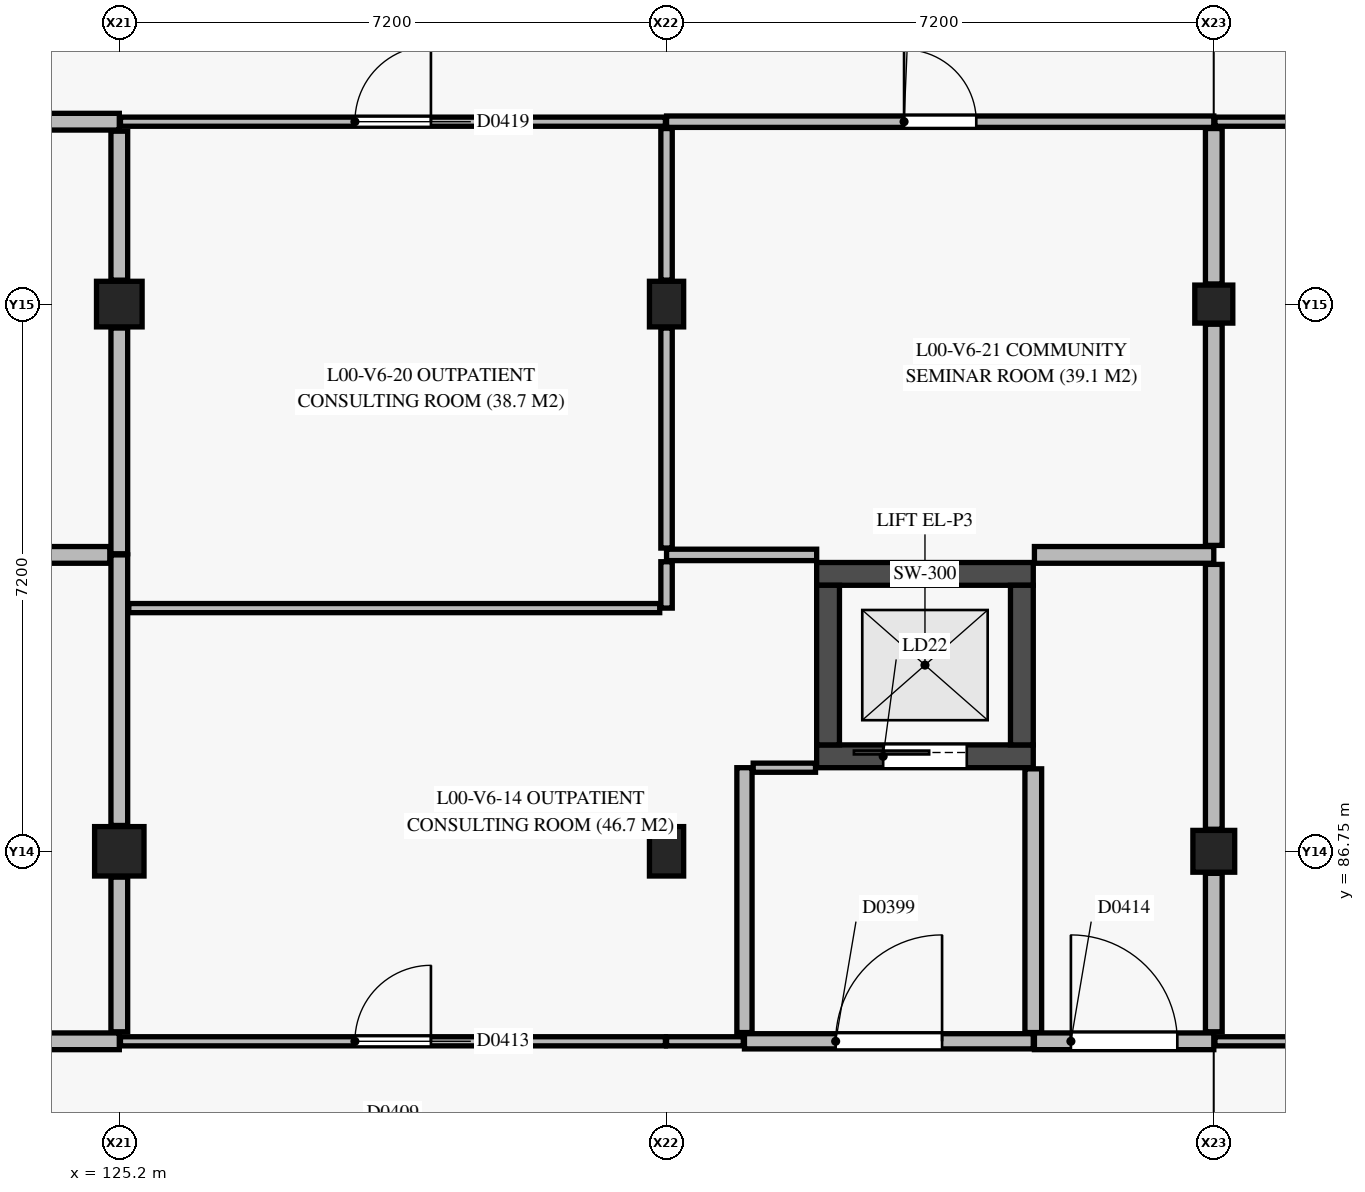
"""IFC4 building model, lengths in metres.
Left out: names, types, materials, properties, quantities, classifications, styles, units other than length and angle.
Written with IfcOpenShell. Run it as: python <this file> out.ifc"""

import sys

from ifc_helpers import new_model, si_unit, direction, frame, frame_2d, origin, origin_2d, place, context, subcontext, project, spatial, rectangle, extrude, element, fill, save


model = new_model("IFC4")
c1 = context("Model", 3, precision=1e-05, world=origin(), true_north=direction((0.0, 1.0)))
c2 = subcontext(c1, "Body", "Model", "MODEL_VIEW")
j1 = project(units=[si_unit("LENGTHUNIT", "METRE"), si_unit("PLANEANGLEUNIT", "RADIAN")], contexts=[c1])
p1 = place(None, origin())
s1 = spatial("IfcSite", under=j1, at=p1, CompositionType="ELEMENT")
p2 = place(p1, origin())
s2 = spatial("IfcBuilding", under=s1, at=p2, CompositionType="ELEMENT")
p3 = place(p2, origin())
s3 = spatial("IfcBuildingStorey", under=s2, at=p3, CompositionType="ELEMENT", Elevation=0.0)
p4 = place(p3, frame((125.2, 86.75, 0.0), z_axis=(0.0, 0.0, 1.0), x_axis=(1.0, 0.0, 0.0)))
e1 = element("IfcColumn", 1, at=p4, inside=s3, PredefinedType="COLUMN", context=c2, shape_type="SweptSolid", body=[
    extrude(rectangle(XDim=0.65, YDim=0.65, at=origin_2d()), origin(), (0.0, 0.0, 1.0), 4.8),
])
p5 = place(p3, frame((125.2, 93.95, 0.0), z_axis=(0.0, 0.0, 1.0), x_axis=(1.0, 0.0, 0.0)))
e2 = element("IfcColumn", 2, at=p5, inside=s3, PredefinedType="COLUMN", context=c2, shape_type="SweptSolid", body=[
    extrude(rectangle(XDim=0.6, YDim=0.6, at=origin_2d()), origin(), (0.0, 0.0, 1.0), 4.8),
])
p6 = place(p3, frame((132.4, 86.75, 0.0), z_axis=(0.0, 0.0, 1.0), x_axis=(1.0, 0.0, 0.0)))
e3 = element("IfcColumn", 3, at=p6, inside=s3, PredefinedType="COLUMN", context=c2, shape_type="SweptSolid", body=[
    extrude(rectangle(XDim=0.45, YDim=0.65, at=origin_2d()), origin(), (0.0, 0.0, 1.0), 4.8),
])
p7 = place(p3, frame((132.4, 93.95, 0.0), z_axis=(0.0, 0.0, 1.0), x_axis=(1.0, 0.0, 0.0)))
e4 = element("IfcColumn", 4, at=p7, inside=s3, PredefinedType="COLUMN", context=c2, shape_type="SweptSolid", body=[
    extrude(rectangle(XDim=0.45, YDim=0.6, at=origin_2d()), origin(), (0.0, 0.0, 1.0), 4.8),
])
p8 = place(p3, frame((139.6, 86.75, 0.0), z_axis=(0.0, 0.0, 1.0), x_axis=(1.0, 0.0, 0.0)))
e5 = element("IfcColumn", 5, at=p8, inside=s3, PredefinedType="COLUMN", context=c2, shape_type="SweptSolid", body=[
    extrude(rectangle(XDim=0.55, YDim=0.55, at=origin_2d()), origin(), (0.0, 0.0, 1.0), 4.8),
])
p9 = place(p3, frame((139.6, 93.95, 0.0), z_axis=(0.0, 0.0, 1.0), x_axis=(1.0, 0.0, 0.0)))
e6 = element("IfcColumn", 6, at=p9, inside=s3, PredefinedType="COLUMN", context=c2, shape_type="SweptSolid", body=[
    extrude(rectangle(XDim=0.5, YDim=0.5, at=origin_2d()), origin(), (0.0, 0.0, 1.0), 4.8),
])
p10 = place(p3, frame((134.375, 88.0, 0.0), z_axis=(0.0, 0.0, 1.0), x_axis=(1.0, 0.0, 0.0)))
e7 = element("IfcWall", 7, at=p10, inside=s3, PredefinedType="SHEAR", context=c2, shape_type="SweptSolid", body=[
    extrude(rectangle(XDim=2.85, YDim=0.3, at=frame_2d((1.425, 0.0))), origin(), (0.0, 0.0, 1.0), 4.52),
])
p11 = place(p10, frame((0.875, 0.0, 0.0)))
e8 = element("IfcOpeningElement", 8, at=p11, cuts=e7, PredefinedType="OPENING", context=c2, shape_type="SweptSolid", body=[
    extrude(rectangle(XDim=1.1, YDim=2.15, at=frame_2d((0.55, 1.075))), frame((0.0, 0.16, 0.0), z_axis=(0.0, -1.0, 0.0), x_axis=(1.0, 0.0, 0.0)), (0.0, 0.0, 1.0), 0.32),
])
p12 = place(p3, frame((134.375, 90.4, 0.0), z_axis=(0.0, 0.0, 1.0), x_axis=(1.0, 0.0, 0.0)))
e9 = element("IfcWall", 9, at=p12, inside=s3, PredefinedType="SHEAR", context=c2, shape_type="SweptSolid", body=[
    extrude(rectangle(XDim=2.85, YDim=0.3, at=frame_2d((1.425, 0.0))), origin(), (0.0, 0.0, 1.0), 4.52),
])
for number, where, z_axis, x_axis in (
    (10, (134.525, 88.15, 0.0), (0.0, 0.0, 1.0), (0.0, 1.0, 0.0)),
    (11, (137.075, 88.15, 0.0), (0.0, 0.0, 1.0), (0.0, 1.0, 0.0)),
):
    element("IfcWall", number, at=place(p3, frame(where, z_axis=z_axis, x_axis=x_axis)), inside=s3, PredefinedType="SHEAR", context=c2, shape_type="SweptSolid", body=[
        extrude(rectangle(XDim=2.1, YDim=0.3, at=frame_2d((1.05, 0.0))), origin(), (0.0, 0.0, 1.0), 4.52),
    ])
p13 = place(p3, frame((133.425, 84.25, 0.0), z_axis=(0.0, 0.0, 1.0), x_axis=(1.0, 0.0, 0.0)))
e12 = element("IfcWall", 12, at=p13, inside=s3, PredefinedType="PARTITIONING", context=c2, shape_type="SweptSolid", body=[
    extrude(rectangle(XDim=3.8, YDim=0.2, at=frame_2d((1.9, 0.0))), origin(), (0.0, 0.0, 1.0), 4.085),
])
p14 = place(p13, frame((1.2, 0.0, 0.0)))
e13 = element("IfcOpeningElement", 13, at=p14, cuts=e12, PredefinedType="OPENING", context=c2, shape_type="SweptSolid", body=[
    extrude(rectangle(XDim=1.4, YDim=2.2, at=frame_2d((0.7, 1.1))), frame((0.0, 0.11, 0.0), z_axis=(0.0, -1.0, 0.0), x_axis=(1.0, 0.0, 0.0)), (0.0, 0.0, 1.0), 0.22),
])
p15 = place(p3, frame((137.225, 84.365, 0.0), z_axis=(0.0, 0.0, 1.0), x_axis=(0.0, 1.0, 0.0)))
e14 = element("IfcWall", 14, at=p15, inside=s3, PredefinedType="PARTITIONING", context=c2, shape_type="SweptSolid", body=[
    extrude(rectangle(XDim=3.47, YDim=0.22, at=frame_2d((1.735, 0.0))), origin(), (0.0, 0.0, 1.0), 3.925),
])
p16 = place(p3, frame((133.425, 84.365, 0.0), z_axis=(0.0, 0.0, 1.0), x_axis=(0.0, 1.0, 0.0)))
e15 = element("IfcWall", 15, at=p16, inside=s3, PredefinedType="PARTITIONING", context=c2, shape_type="SweptSolid", body=[
    extrude(rectangle(XDim=3.485, YDim=0.2, at=frame_2d((1.743, 0.0))), origin(), (0.0, 0.0, 1.0), 3.925),
])
p17 = place(p3, frame((122.8, 84.25, 0.0), z_axis=(0.0, 0.0, 1.0), x_axis=(1.0, 0.0, 0.0)))
e16 = element("IfcWall", 16, at=p17, inside=s3, PredefinedType="PARTITIONING", context=c2, shape_type="SweptSolid", body=[
    extrude(rectangle(XDim=2.4, YDim=0.22, at=frame_2d((1.2, 0.0))), origin(), (0.0, 0.0, 1.0), 3.785),
])
p18 = place(p3, frame((137.24, 84.25, 0.0), z_axis=(0.0, 0.0, 1.0), x_axis=(1.0, 0.0, 0.0)))
e17 = element("IfcWall", 17, at=p18, inside=s3, PredefinedType="PARTITIONING", context=c2, shape_type="SweptSolid", body=[
    extrude(rectangle(XDim=2.36, YDim=0.22, at=frame_2d((1.18, 0.0))), origin(), (0.0, 0.0, 1.0), 3.805),
])
p19 = place(p18, frame((0.48, 0.0, 0.0)))
e18 = element("IfcOpeningElement", 18, at=p19, cuts=e17, PredefinedType="OPENING", context=c2, shape_type="SweptSolid", body=[
    extrude(rectangle(XDim=1.4, YDim=2.2, at=frame_2d((0.7, 1.1))), frame((0.0, 0.12, 0.0), z_axis=(0.0, -1.0, 0.0), x_axis=(1.0, 0.0, 0.0)), (0.0, 0.0, 1.0), 0.24),
])
p20 = place(p3, frame((122.925, 96.35, 0.0), z_axis=(0.0, 0.0, 1.0), x_axis=(1.0, 0.0, 0.0)))
e19 = element("IfcWall", 19, at=p20, inside=s3, PredefinedType="PARTITIONING", context=c2, shape_type="SweptSolid", body=[
    extrude(rectangle(XDim=2.275, YDim=0.22, at=frame_2d((1.137, 0.0))), origin(), (0.0, 0.0, 1.0), 3.855),
])
p21 = place(p3, frame((132.4, 96.35, 0.0), z_axis=(0.0, 0.0, 1.0), x_axis=(1.0, 0.0, 0.0)))
e20 = element("IfcWall", 20, at=p21, inside=s3, PredefinedType="PARTITIONING", context=c2, shape_type="SweptSolid", body=[
    extrude(rectangle(XDim=7.2, YDim=0.15, at=frame_2d((3.6, 0.0))), origin(), (0.0, 0.0, 1.0), 3.705),
])
p22 = place(p21, frame((3.125, 0.0, 0.0)))
e21 = element("IfcOpeningElement", 21, at=p22, cuts=e20, PredefinedType="OPENING", context=c2, shape_type="SweptSolid", body=[
    extrude(rectangle(XDim=0.95, YDim=2.1, at=frame_2d((0.475, 1.05))), frame((0.0, 0.085, 0.0), z_axis=(0.0, -1.0, 0.0), x_axis=(1.0, 0.0, 0.0)), (0.0, 0.0, 1.0), 0.17),
])
p23 = place(p3, frame((132.4, 84.25, 0.0), z_axis=(0.0, 0.0, 1.0), x_axis=(1.0, 0.0, 0.0)))
e22 = element("IfcWall", 22, at=p23, inside=s3, PredefinedType="PARTITIONING", context=c2, shape_type="SweptSolid", body=[
    extrude(rectangle(XDim=1.01, YDim=0.12, at=frame_2d((0.505, 0.0))), origin(), (0.0, 0.0, 1.0), 3.925),
])
p24 = place(p3, frame((125.215, 84.25, 0.0), z_axis=(0.0, 0.0, 1.0), x_axis=(1.0, 0.0, 0.0)))
e23 = element("IfcWall", 23, at=p24, inside=s3, PredefinedType="PARTITIONING", context=c2, shape_type="SweptSolid", body=[
    extrude(rectangle(XDim=7.17, YDim=0.12, at=frame_2d((3.585, 0.0))), origin(), (0.0, 0.0, 1.0), 3.785),
])
p25 = place(p24, frame((3.085, 0.0, 0.0)))
e24 = element("IfcOpeningElement", 24, at=p25, cuts=e23, PredefinedType="OPENING", context=c2, shape_type="SweptSolid", body=[
    extrude(rectangle(XDim=1.0, YDim=2.15, at=frame_2d((0.5, 1.075))), frame((0.0, 0.07, 0.0), z_axis=(0.0, -1.0, 0.0), x_axis=(1.0, 0.0, 0.0)), (0.0, 0.0, 1.0), 0.14),
])
p26 = place(p3, frame((139.615, 84.25, 0.0), z_axis=(0.0, 0.0, 1.0), x_axis=(1.0, 0.0, 0.0)))
e25 = element("IfcWall", 25, at=p26, inside=s3, PredefinedType="PARTITIONING", context=c2, shape_type="SweptSolid", body=[
    extrude(rectangle(XDim=7.17, YDim=0.12, at=frame_2d((3.585, 0.0))), origin(), (0.0, 0.0, 1.0), 3.805),
])
p27 = place(p26, frame((2.785, 0.0, 0.0)))
e26 = element("IfcOpeningElement", 26, at=p27, cuts=e25, PredefinedType="OPENING", context=c2, shape_type="SweptSolid", body=[
    extrude(rectangle(XDim=1.6, YDim=2.25, at=frame_2d((0.8, 1.125))), frame((0.0, 0.07, 0.0), z_axis=(0.0, -1.0, 0.0), x_axis=(1.0, 0.0, 0.0)), (0.0, 0.0, 1.0), 0.14),
])
p28 = place(p3, frame((139.615, 96.35, 0.0), z_axis=(0.0, 0.0, 1.0), x_axis=(1.0, 0.0, 0.0)))
e27 = element("IfcWall", 27, at=p28, inside=s3, PredefinedType="PARTITIONING", context=c2, shape_type="SweptSolid", body=[
    extrude(rectangle(XDim=4.695, YDim=0.12, at=frame_2d((2.348, 0.0))), origin(), (0.0, 0.0, 1.0), 3.925),
])
p29 = place(p3, frame((125.215, 96.35, 0.0), z_axis=(0.0, 0.0, 1.0), x_axis=(1.0, 0.0, 0.0)))
e28 = element("IfcWall", 28, at=p29, inside=s3, PredefinedType="PARTITIONING", context=c2, shape_type="SweptSolid", body=[
    extrude(rectangle(XDim=7.17, YDim=0.12, at=frame_2d((3.585, 0.0))), origin(), (0.0, 0.0, 1.0), 3.705),
])
p30 = place(p29, frame((3.085, 0.0, 0.0)))
e29 = element("IfcOpeningElement", 29, at=p30, cuts=e28, PredefinedType="OPENING", context=c2, shape_type="SweptSolid", body=[
    extrude(rectangle(XDim=1.0, YDim=2.15, at=frame_2d((0.5, 1.075))), frame((0.0, 0.07, 0.0), z_axis=(0.0, -1.0, 0.0), x_axis=(1.0, 0.0, 0.0)), (0.0, 0.0, 1.0), 0.14),
])
p31 = place(p3, frame((125.2, 84.375, 0.0), z_axis=(0.0, 0.0, 1.0), x_axis=(0.0, 1.0, 0.0)))
e30 = element("IfcWall", 30, at=p31, inside=s3, PredefinedType="PARTITIONING", context=c2, shape_type="SweptSolid", body=[
    extrude(rectangle(XDim=2.035, YDim=0.22, at=frame_2d((1.018, 0.0))), origin(), (0.0, 0.0, 1.0), 3.785),
])
p32 = place(p3, frame((125.2, 87.09, 0.0), z_axis=(0.0, 0.0, 1.0), x_axis=(0.0, 1.0, 0.0)))
e31 = element("IfcWall", 31, at=p32, inside=s3, PredefinedType="PARTITIONING", context=c2, shape_type="SweptSolid", body=[
    extrude(rectangle(XDim=3.56, YDim=0.22, at=frame_2d((1.78, 0.0))), origin(), (0.0, 0.0, 1.0), 3.855),
])
p33 = place(p3, frame((122.925, 90.65, 0.0), z_axis=(0.0, 0.0, 1.0), x_axis=(1.0, 0.0, 0.0)))
e32 = element("IfcWall", 32, at=p33, inside=s3, PredefinedType="PARTITIONING", context=c2, shape_type="SweptSolid", body=[
    extrude(rectangle(XDim=2.15, YDim=0.22, at=frame_2d((1.075, 0.0))), origin(), (0.0, 0.0, 1.0), 4.52),
])
p34 = place(p3, frame((137.24, 90.65, 0.0), z_axis=(0.0, 0.0, 1.0), x_axis=(1.0, 0.0, 0.0)))
e33 = element("IfcWall", 33, at=p34, inside=s3, PredefinedType="PARTITIONING", context=c2, shape_type="SweptSolid", body=[
    extrude(rectangle(XDim=2.36, YDim=0.22, at=frame_2d((1.18, 0.0))), origin(), (0.0, 0.0, 1.0), 3.925),
])
p35 = place(p3, frame((139.6, 84.375, 0.0), z_axis=(0.0, 0.0, 1.0), x_axis=(0.0, 1.0, 0.0)))
e34 = element("IfcWall", 34, at=p35, inside=s3, PredefinedType="PARTITIONING", context=c2, shape_type="SweptSolid", body=[
    extrude(rectangle(XDim=2.085, YDim=0.22, at=frame_2d((1.042, 0.0))), origin(), (0.0, 0.0, 1.0), 3.805),
])
p36 = place(p3, frame((139.6, 87.04, 0.0), z_axis=(0.0, 0.0, 1.0), x_axis=(0.0, 1.0, 0.0)))
e35 = element("IfcWall", 35, at=p36, inside=s3, PredefinedType="PARTITIONING", context=c2, shape_type="SweptSolid", body=[
    extrude(rectangle(XDim=3.485, YDim=0.22, at=frame_2d((1.742, 0.0))), origin(), (0.0, 0.0, 1.0), 3.925),
])
p37 = place(p3, frame((139.6, 90.775, 0.0), z_axis=(0.0, 0.0, 1.0), x_axis=(0.0, 1.0, 0.0)))
e36 = element("IfcWall", 36, at=p37, inside=s3, PredefinedType="PARTITIONING", context=c2, shape_type="SweptSolid", body=[
    extrude(rectangle(XDim=2.91, YDim=0.22, at=frame_2d((1.455, 0.0))), origin(), (0.0, 0.0, 1.0), 3.925),
])
p38 = place(p3, frame((139.6, 94.215, 0.0), z_axis=(0.0, 0.0, 1.0), x_axis=(0.0, 1.0, 0.0)))
e37 = element("IfcWall", 37, at=p38, inside=s3, PredefinedType="PARTITIONING", context=c2, shape_type="SweptSolid", body=[
    extrude(rectangle(XDim=2.045, YDim=0.22, at=frame_2d((1.022, 0.0))), origin(), (0.0, 0.0, 1.0), 3.925),
])
p39 = place(p3, frame((125.2, 90.665, 0.0), z_axis=(0.0, 0.0, 1.0), x_axis=(0.0, 1.0, 0.0)))
e38 = element("IfcWall", 38, at=p39, inside=s3, PredefinedType="PARTITIONING", context=c2, shape_type="SweptSolid", body=[
    extrude(rectangle(XDim=2.97, YDim=0.22, at=frame_2d((1.485, 0.0))), origin(), (0.0, 0.0, 1.0), 3.855),
])
p40 = place(p3, frame((125.2, 94.265, 0.0), z_axis=(0.0, 0.0, 1.0), x_axis=(0.0, 1.0, 0.0)))
e39 = element("IfcWall", 39, at=p40, inside=s3, PredefinedType="PARTITIONING", context=c2, shape_type="SweptSolid", body=[
    extrude(rectangle(XDim=1.96, YDim=0.22, at=frame_2d((0.98, 0.0))), origin(), (0.0, 0.0, 1.0), 3.855),
])
p41 = place(p3, frame((132.4, 90.65, 0.0), z_axis=(0.0, 0.0, 1.0), x_axis=(1.0, 0.0, 0.0)))
e40 = element("IfcWall", 40, at=p41, inside=s3, PredefinedType="PARTITIONING", context=c2, shape_type="SweptSolid", body=[
    extrude(rectangle(XDim=1.975, YDim=0.15, at=frame_2d((0.988, 0.0))), origin(), (0.0, 0.0, 1.0), 3.955),
])
p42 = place(p3, frame((132.4, 89.95, 0.0), z_axis=(0.0, 0.0, 1.0), x_axis=(0.0, 1.0, 0.0)))
e41 = element("IfcWall", 41, at=p42, inside=s3, PredefinedType="PARTITIONING", context=c2, shape_type="SweptSolid", body=[
    extrude(rectangle(XDim=0.61, YDim=0.15, at=frame_2d((0.305, 0.0))), origin(), (0.0, 0.0, 1.0), 3.955),
])
p43 = place(p3, frame((132.4, 90.74, 0.0), z_axis=(0.0, 0.0, 1.0), x_axis=(0.0, 1.0, 0.0)))
e42 = element("IfcWall", 42, at=p43, inside=s3, PredefinedType="PARTITIONING", context=c2, shape_type="SweptSolid", body=[
    extrude(rectangle(XDim=2.895, YDim=0.15, at=frame_2d((1.448, 0.0))), origin(), (0.0, 0.0, 1.0), 3.955),
])
p44 = place(p3, frame((132.4, 94.265, 0.0), z_axis=(0.0, 0.0, 1.0), x_axis=(0.0, 1.0, 0.0)))
e43 = element("IfcWall", 43, at=p44, inside=s3, PredefinedType="PARTITIONING", context=c2, shape_type="SweptSolid", body=[
    extrude(rectangle(XDim=1.995, YDim=0.15, at=frame_2d((0.998, 0.0))), origin(), (0.0, 0.0, 1.0), 3.705),
])
p45 = place(p3, frame((125.325, 89.95, 0.0), z_axis=(0.0, 0.0, 1.0), x_axis=(1.0, 0.0, 0.0)))
e44 = element("IfcWall", 44, at=p45, inside=s3, PredefinedType="PARTITIONING", context=c2, shape_type="SweptSolid", body=[
    extrude(rectangle(XDim=6.985, YDim=0.12, at=frame_2d((3.493, 0.0))), origin(), (0.0, 0.0, 1.0), 4.52),
])
p46 = place(p3, frame((133.54, 87.85, 0.0), z_axis=(0.0, 0.0, 1.0), x_axis=(1.0, 0.0, 0.0)))
e45 = element("IfcWall", 45, at=p46, inside=s3, PredefinedType="PARTITIONING", context=c2, shape_type="SweptSolid", body=[
    extrude(rectangle(XDim=0.82, YDim=0.12, at=frame_2d((0.41, 0.0))), origin(), (0.0, 0.0, 1.0), 4.52),
])
p47 = place(p11, origin())
e46 = element("IfcDoor", 46, at=p47, inside=s3, OperationType="SLIDING_TO_LEFT", PredefinedType="DOOR", context=c2, shape_type="SweptSolid", body=[
    extrude(rectangle(XDim=1.1, YDim=2.15, at=frame_2d((0.55, 1.075))), frame((0.0, 0.025, 0.0), z_axis=(0.0, -1.0, 0.0), x_axis=(1.0, 0.0, 0.0)), (0.0, 0.0, 1.0), 0.05),
])
fill(e8, e46)
p48 = place(p14, origin())
e47 = element("IfcDoor", 47, at=p48, inside=s3, OperationType="SINGLE_SWING_RIGHT", PredefinedType="DOOR", context=c2, shape_type="SweptSolid", body=[
    extrude(rectangle(XDim=1.4, YDim=2.2, at=frame_2d((0.7, 1.1))), frame((0.0, 0.025, 0.0), z_axis=(0.0, -1.0, 0.0), x_axis=(1.0, 0.0, 0.0)), (0.0, 0.0, 1.0), 0.05),
])
fill(e13, e47)
p49 = place(p25, origin())
e48 = element("IfcDoor", 48, at=p49, inside=s3, OperationType="SINGLE_SWING_RIGHT", PredefinedType="DOOR", context=c2, shape_type="SweptSolid", body=[
    extrude(rectangle(XDim=1.0, YDim=2.15, at=frame_2d((0.5, 1.075))), frame((0.0, 0.025, 0.0), z_axis=(0.0, -1.0, 0.0), x_axis=(1.0, 0.0, 0.0)), (0.0, 0.0, 1.0), 0.05),
])
fill(e24, e48)
p50 = place(p19, origin())
e49 = element("IfcDoor", 49, at=p50, inside=s3, OperationType="SINGLE_SWING_LEFT", PredefinedType="DOOR", context=c2, shape_type="SweptSolid", body=[
    extrude(rectangle(XDim=1.4, YDim=2.2, at=frame_2d((0.7, 1.1))), frame((0.0, 0.025, 0.0), z_axis=(0.0, -1.0, 0.0), x_axis=(1.0, 0.0, 0.0)), (0.0, 0.0, 1.0), 0.05),
])
fill(e18, e49)
p51 = place(p30, origin())
e50 = element("IfcDoor", 50, at=p51, inside=s3, OperationType="SINGLE_SWING_RIGHT", PredefinedType="DOOR", context=c2, shape_type="SweptSolid", body=[
    extrude(rectangle(XDim=1.0, YDim=2.15, at=frame_2d((0.5, 1.075))), frame((0.0, 0.025, 0.0), z_axis=(0.0, -1.0, 0.0), x_axis=(1.0, 0.0, 0.0)), (0.0, 0.0, 1.0), 0.05),
])
fill(e29, e50)
p52 = place(p22, origin())
e51 = element("IfcDoor", 51, at=p52, inside=s3, OperationType="SINGLE_SWING_LEFT", PredefinedType="DOOR", context=c2, shape_type="SweptSolid", body=[
    extrude(rectangle(XDim=0.95, YDim=2.1, at=frame_2d((0.475, 1.05))), frame((0.0, 0.025, 0.0), z_axis=(0.0, -1.0, 0.0), x_axis=(1.0, 0.0, 0.0)), (0.0, 0.0, 1.0), 0.05),
])
fill(e21, e51)
save(model, sys.argv[1])
